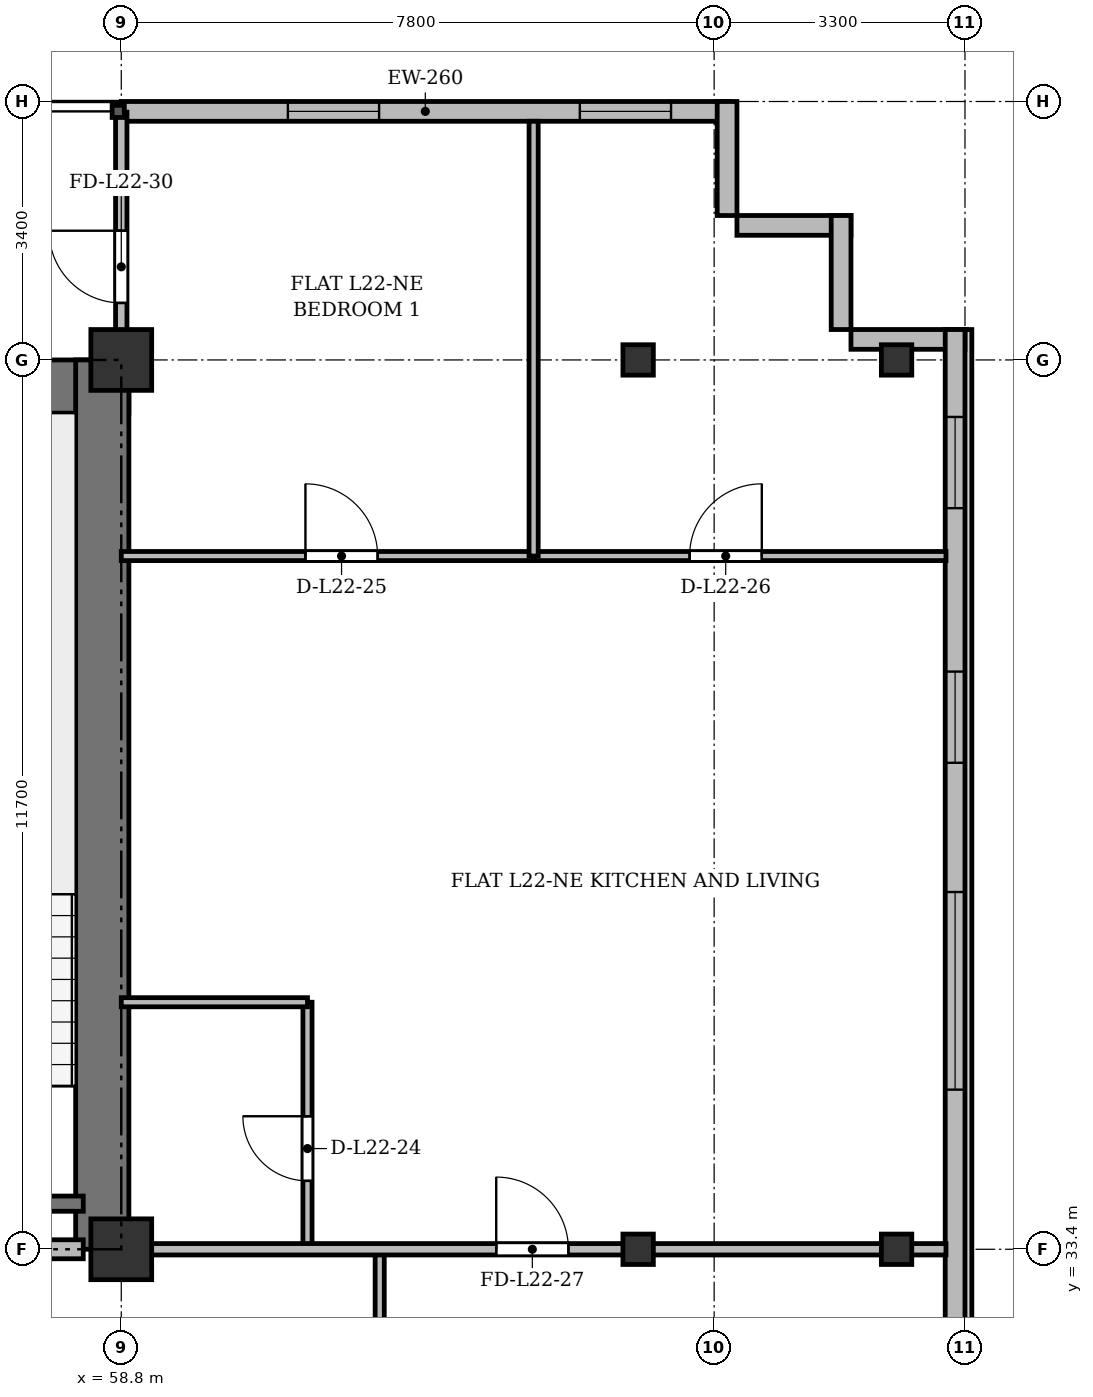
"""IFC4 building model, lengths in metres.
Left out: names, types, materials, properties, quantities, classifications, styles, units other than length and angle.
Written with IfcOpenShell. Run it as: python <this file> out.ifc"""

import sys

from ifc_helpers import new_model, si_unit, direction, frame, frame_2d, origin, origin_2d, place, context, subcontext, project, spatial, rectangle, i_section, extrude, source, transform, mapped, element, fill, save


model = new_model("IFC4")
c1 = context("Model", 3, precision=1e-05, world=origin(), true_north=direction((0.0, 1.0)))
c2 = subcontext(c1, "Body", "Model", "MODEL_VIEW")
j1 = project(units=[si_unit("LENGTHUNIT", "METRE"), si_unit("PLANEANGLEUNIT", "RADIAN")], contexts=[c1])
p1 = place(None, origin())
s1 = spatial("IfcSite", under=j1, at=p1, CompositionType="ELEMENT")
p2 = place(p1, origin())
s2 = spatial("IfcBuilding", under=s1, at=p2, CompositionType="ELEMENT")
p3 = place(p2, frame((0.0, 0.0, 88.9)))
s3 = spatial("IfcBuildingStorey", under=s2, at=p3, CompositionType="ELEMENT", Elevation=88.9)
m1 = source(origin(), c2, "Body", "SweptSolid", [
    extrude(rectangle(XDim=0.8, YDim=0.8, at=origin_2d()), origin(), (0.0, 0.0, 1.0), 3.6),
])
for number, where, z_axis, x_axis in (
    (1, (58.8, 33.4, 0.0), (0.0, 0.0, 1.0), (1.0, 0.0, 0.0)),
    (2, (58.8, 45.1, 0.0), (0.0, 0.0, 1.0), (1.0, 0.0, 0.0)),
):
    element("IfcColumn", number, at=place(p3, frame(where, z_axis=z_axis, x_axis=x_axis)), inside=s3, PredefinedType="COLUMN", context=c2, shape_type="MappedRepresentation", body=[
        mapped(m1, transform((0.0, 0.0, 0.0), x_axis=(1.0, 0.0, 0.0), y_axis=(0.0, 1.0, 0.0), z_axis=(0.0, 0.0, 1.0), scale=1.0)),
    ])
m2 = source(origin(), c2, "Body", "SweptSolid", [
    extrude(i_section(OverallWidth=0.4, OverallDepth=0.4, WebThickness=0.022, FlangeThickness=0.035, at=origin_2d()), origin(), (0.0, 0.0, 1.0), 3.6),
])
for number, where, z_axis, x_axis in (
    (3, (65.6, 33.4, 0.0), (0.0, 0.0, 1.0), (1.0, 0.0, 0.0)),
    (4, (65.6, 45.1, 0.0), (0.0, 0.0, 1.0), (1.0, 0.0, 0.0)),
    (5, (69.0, 33.4, 0.0), (0.0, 0.0, 1.0), (1.0, 0.0, 0.0)),
    (6, (69.0, 45.1, 0.0), (0.0, 0.0, 1.0), (1.0, 0.0, 0.0)),
):
    element("IfcColumn", number, at=place(p3, frame(where, z_axis=z_axis, x_axis=x_axis)), inside=s3, PredefinedType="COLUMN", context=c2, shape_type="MappedRepresentation", body=[
        mapped(m2, transform((0.0, 0.0, 0.0), x_axis=(1.0, 0.0, 0.0), y_axis=(0.0, 1.0, 0.0), z_axis=(0.0, 0.0, 1.0), scale=1.0)),
    ])
p4 = place(p3, frame((58.8, 48.37, 0.0), z_axis=(0.0, 0.0, 1.0), x_axis=(1.0, 0.0, 0.0)))
e7 = element("IfcWall", 7, at=p4, inside=s3, PredefinedType="SOLIDWALL", context=c2, shape_type="SweptSolid", body=[
    extrude(rectangle(XDim=8.0, YDim=0.26, at=frame_2d((4.0, 0.0))), origin(), (0.0, 0.0, 1.0), 3.34),
])
p5 = place(p4, frame((2.192, 0.0, 0.9)))
e8 = element("IfcOpeningElement", 8, at=p5, cuts=e7, PredefinedType="OPENING", context=c2, shape_type="SweptSolid", body=[
    extrude(rectangle(XDim=1.2, YDim=1.65, at=frame_2d((0.6, 0.825))), frame((0.0, 0.14, 0.0), z_axis=(0.0, -1.0, 0.0), x_axis=(1.0, 0.0, 0.0)), (0.0, 0.0, 1.0), 0.28),
])
p6 = place(p4, frame((6.033, 0.0, 0.9)))
e9 = element("IfcOpeningElement", 9, at=p6, cuts=e7, PredefinedType="OPENING", context=c2, shape_type="SweptSolid", body=[
    extrude(rectangle(XDim=1.2, YDim=1.65, at=frame_2d((0.6, 0.825))), frame((0.0, 0.14, 0.0), z_axis=(0.0, -1.0, 0.0), x_axis=(1.0, 0.0, 0.0)), (0.0, 0.0, 1.0), 0.28),
])
for number, where, z_axis, x_axis in (
    (10, (66.77, 48.5, 0.0), (0.0, 0.0, 1.0), (0.0, -1.0, 0.0)),
    (11, (66.9, 46.87, 0.0), (0.0, 0.0, 1.0), (1.0, 0.0, 0.0)),
    (12, (68.27, 47.0, 0.0), (0.0, 0.0, 1.0), (0.0, -1.0, 0.0)),
):
    element("IfcWall", number, at=place(p3, frame(where, z_axis=z_axis, x_axis=x_axis)), inside=s3, PredefinedType="SOLIDWALL", context=c2, shape_type="SweptSolid", body=[
        extrude(rectangle(XDim=1.5, YDim=0.26, at=frame_2d((0.75, 0.0))), origin(), (0.0, 0.0, 1.0), 3.34),
    ])
p7 = place(p3, frame((68.4, 45.37, 0.0), z_axis=(0.0, 0.0, 1.0), x_axis=(1.0, 0.0, 0.0)))
e13 = element("IfcWall", 13, at=p7, inside=s3, PredefinedType="SOLIDWALL", context=c2, shape_type="SweptSolid", body=[
    extrude(rectangle(XDim=1.5, YDim=0.26, at=frame_2d((0.75, 0.0))), origin(), (0.0, 0.0, 1.0), 2.752),
])
p8 = place(p3, frame((69.77, 45.5, 0.0), z_axis=(0.0, 0.0, 1.0), x_axis=(0.0, -1.0, 0.0)))
e14 = element("IfcWall", 14, at=p8, inside=s3, PredefinedType="SOLIDWALL", context=c2, shape_type="SweptSolid", body=[
    extrude(rectangle(XDim=39.6, YDim=0.26, at=frame_2d((19.8, 0.0))), origin(), (0.0, 0.0, 1.0), 3.34),
])
p9 = place(p8, frame((36.95, 0.0, 0.92)))
e15 = element("IfcOpeningElement", 15, at=p9, cuts=e14, PredefinedType="OPENING", context=c2, shape_type="SweptSolid", body=[
    extrude(rectangle(XDim=1.2, YDim=1.65, at=frame_2d((0.6, 0.825))), frame((0.0, 0.14, 0.0), z_axis=(0.0, -1.0, 0.0), x_axis=(1.0, 0.0, 0.0)), (0.0, 0.0, 1.0), 0.28),
])
p10 = place(p8, frame((32.8, 0.0, 0.92)))
e16 = element("IfcOpeningElement", 16, at=p10, cuts=e14, PredefinedType="OPENING", context=c2, shape_type="SweptSolid", body=[
    extrude(rectangle(XDim=2.6, YDim=1.9, at=frame_2d((1.3, 0.95))), frame((0.0, 0.14, 0.0), z_axis=(0.0, -1.0, 0.0), x_axis=(1.0, 0.0, 0.0)), (0.0, 0.0, 1.0), 0.28),
])
p11 = place(p8, frame((28.6, 0.0, 0.92)))
e17 = element("IfcOpeningElement", 17, at=p11, cuts=e14, PredefinedType="OPENING", context=c2, shape_type="SweptSolid", body=[
    extrude(rectangle(XDim=2.6, YDim=1.9, at=frame_2d((1.3, 0.95))), frame((0.0, 0.14, 0.0), z_axis=(0.0, -1.0, 0.0), x_axis=(1.0, 0.0, 0.0)), (0.0, 0.0, 1.0), 0.28),
])
p12 = place(p8, frame((21.4, 0.0, 0.92)))
e18 = element("IfcOpeningElement", 18, at=p12, cuts=e14, PredefinedType="OPENING", context=c2, shape_type="SweptSolid", body=[
    extrude(rectangle(XDim=2.6, YDim=1.9, at=frame_2d((1.3, 0.95))), frame((0.0, 0.14, 0.0), z_axis=(0.0, -1.0, 0.0), x_axis=(1.0, 0.0, 0.0)), (0.0, 0.0, 1.0), 0.28),
])
p13 = place(p8, frame((7.4, 0.0, 0.92)))
e19 = element("IfcOpeningElement", 19, at=p13, cuts=e14, PredefinedType="OPENING", context=c2, shape_type="SweptSolid", body=[
    extrude(rectangle(XDim=2.6, YDim=1.9, at=frame_2d((1.3, 0.95))), frame((0.0, 0.14, 0.0), z_axis=(0.0, -1.0, 0.0), x_axis=(1.0, 0.0, 0.0)), (0.0, 0.0, 1.0), 0.28),
])
p14 = place(p8, frame((4.5, 0.0, 0.92)))
e20 = element("IfcOpeningElement", 20, at=p14, cuts=e14, PredefinedType="OPENING", context=c2, shape_type="SweptSolid", body=[
    extrude(rectangle(XDim=1.2, YDim=1.65, at=frame_2d((0.6, 0.825))), frame((0.0, 0.14, 0.0), z_axis=(0.0, -1.0, 0.0), x_axis=(1.0, 0.0, 0.0)), (0.0, 0.0, 1.0), 0.28),
])
p15 = place(p8, frame((1.15, 0.0, 0.92)))
e21 = element("IfcOpeningElement", 21, at=p15, cuts=e14, PredefinedType="OPENING", context=c2, shape_type="SweptSolid", body=[
    extrude(rectangle(XDim=1.2, YDim=1.65, at=frame_2d((0.6, 0.825))), frame((0.0, 0.14, 0.0), z_axis=(0.0, -1.0, 0.0), x_axis=(1.0, 0.0, 0.0)), (0.0, 0.0, 1.0), 0.28),
])
p16 = place(p3, frame((15.5, 44.75, 0.0), z_axis=(0.0, 0.0, 1.0), x_axis=(1.0, 0.0, 0.0)))
e22 = element("IfcWall", 22, at=p16, inside=s3, PredefinedType="SHEAR", context=c2, shape_type="SweptSolid", body=[
    extrude(rectangle(XDim=43.4, YDim=0.7, at=frame_2d((21.7, 0.0))), origin(), (0.0, 0.0, 1.0), 3.34),
])
p17 = place(p3, frame((58.55, 33.4, 0.0), z_axis=(0.0, 0.0, 1.0), x_axis=(0.0, 1.0, 0.0)))
e23 = element("IfcWall", 23, at=p17, inside=s3, PredefinedType="SHEAR", context=c2, shape_type="SweptSolid", body=[
    extrude(rectangle(XDim=11.7, YDim=0.7, at=frame_2d((5.85, 0.0))), origin(), (0.0, 0.0, 1.0), 3.34),
])
p18 = place(p3, frame((54.9, 34.0, 0.0), z_axis=(0.0, 0.0, 1.0), x_axis=(1.0, 0.0, 0.0)))
e24 = element("IfcWall", 24, at=p18, inside=s3, PredefinedType="SHEAR", context=c2, shape_type="SweptSolid", body=[
    extrude(rectangle(XDim=3.4, YDim=0.2, at=frame_2d((1.7, 0.0))), origin(), (0.0, 0.0, 1.0), 3.34),
])
p19 = place(p3, frame((47.15, 33.4, 0.0), z_axis=(0.0, 0.0, 1.0), x_axis=(1.0, 0.0, 0.0)))
e25 = element("IfcWall", 25, at=p19, inside=s3, PredefinedType="PARTITIONING", context=c2, shape_type="SweptSolid", body=[
    extrude(rectangle(XDim=11.15, YDim=0.25, at=frame_2d((5.575, 0.0))), origin(), (0.0, 0.0, 1.0), 2.752),
])
p20 = place(p19, frame((0.7, 0.0, 0.0)))
e26 = element("IfcOpeningElement", 26, at=p20, cuts=e25, PredefinedType="OPENING", context=c2, shape_type="SweptSolid", body=[
    extrude(rectangle(XDim=0.95, YDim=2.15, at=frame_2d((0.475, 1.075))), frame((0.0, 0.135, 0.0), z_axis=(0.0, -1.0, 0.0), x_axis=(1.0, 0.0, 0.0)), (0.0, 0.0, 1.0), 0.27),
])
p21 = place(p19, frame((6.0, 0.0, 0.0)))
e27 = element("IfcOpeningElement", 27, at=p21, cuts=e25, PredefinedType="OPENING", context=c2, shape_type="SweptSolid", body=[
    extrude(rectangle(XDim=1.2, YDim=2.15, at=frame_2d((0.6, 1.075))), frame((0.0, 0.135, 0.0), z_axis=(0.0, -1.0, 0.0), x_axis=(1.0, 0.0, 0.0)), (0.0, 0.0, 1.0), 0.27),
])
p22 = place(p3, frame((62.2, 29.8, 0.0), z_axis=(0.0, 0.0, 1.0), x_axis=(0.0, 1.0, 0.0)))
e28 = element("IfcWall", 28, at=p22, inside=s3, PredefinedType="PARTITIONING", context=c2, shape_type="SweptSolid", body=[
    extrude(rectangle(XDim=3.6, YDim=0.12, at=frame_2d((1.8, 0.0))), origin(), (0.0, 0.0, 1.0), 2.752),
])
p23 = place(p3, frame((61.25, 33.4, 0.0), z_axis=(0.0, 0.0, 1.0), x_axis=(0.0, 1.0, 0.0)))
e29 = element("IfcWall", 29, at=p23, inside=s3, PredefinedType="PARTITIONING", context=c2, shape_type="SweptSolid", body=[
    extrude(rectangle(XDim=3.25, YDim=0.12, at=frame_2d((1.625, 0.0))), origin(), (0.0, 0.0, 1.0), 2.752),
])
p24 = place(p23, frame((0.9, 0.0, 0.0)))
e30 = element("IfcOpeningElement", 30, at=p24, cuts=e29, PredefinedType="OPENING", context=c2, shape_type="SweptSolid", body=[
    extrude(rectangle(XDim=0.85, YDim=2.1, at=frame_2d((0.425, 1.05))), frame((0.0, 0.07, 0.0), z_axis=(0.0, -1.0, 0.0), x_axis=(1.0, 0.0, 0.0)), (0.0, 0.0, 1.0), 0.14),
])
p25 = place(p3, frame((58.8, 36.65, 0.0), z_axis=(0.0, 0.0, 1.0), x_axis=(1.0, 0.0, 0.0)))
e31 = element("IfcWall", 31, at=p25, inside=s3, PredefinedType="PARTITIONING", context=c2, shape_type="SweptSolid", body=[
    extrude(rectangle(XDim=2.45, YDim=0.12, at=frame_2d((1.225, 0.0))), origin(), (0.0, 0.0, 1.0), 2.84),
])
p26 = place(p3, frame((58.8, 42.52, 0.0), z_axis=(0.0, 0.0, 1.0), x_axis=(1.0, 0.0, 0.0)))
e32 = element("IfcWall", 32, at=p26, inside=s3, PredefinedType="PARTITIONING", context=c2, shape_type="SweptSolid", body=[
    extrude(rectangle(XDim=5.425, YDim=0.12, at=frame_2d((2.712, 0.0))), origin(), (0.0, 0.0, 1.0), 2.84),
])
p27 = place(p26, frame((2.423, 0.0, 0.0)))
e33 = element("IfcOpeningElement", 33, at=p27, cuts=e32, PredefinedType="OPENING", context=c2, shape_type="SweptSolid", body=[
    extrude(rectangle(XDim=0.95, YDim=2.15, at=frame_2d((0.475, 1.075))), frame((0.0, 0.07, 0.0), z_axis=(0.0, -1.0, 0.0), x_axis=(1.0, 0.0, 0.0)), (0.0, 0.0, 1.0), 0.14),
])
p28 = place(p3, frame((64.225, 42.52, 0.0), z_axis=(0.0, 0.0, 1.0), x_axis=(1.0, 0.0, 0.0)))
e34 = element("IfcWall", 34, at=p28, inside=s3, PredefinedType="PARTITIONING", context=c2, shape_type="SweptSolid", body=[
    extrude(rectangle(XDim=5.425, YDim=0.12, at=frame_2d((2.712, 0.0))), origin(), (0.0, 0.0, 1.0), 2.84),
])
p29 = place(p28, frame((2.052, 0.0, 0.0)))
e35 = element("IfcOpeningElement", 35, at=p29, cuts=e34, PredefinedType="OPENING", context=c2, shape_type="SweptSolid", body=[
    extrude(rectangle(XDim=0.95, YDim=2.15, at=frame_2d((0.475, 1.075))), frame((0.0, 0.07, 0.0), z_axis=(0.0, -1.0, 0.0), x_axis=(1.0, 0.0, 0.0)), (0.0, 0.0, 1.0), 0.14),
])
p30 = place(p3, frame((64.225, 42.52, 0.0), z_axis=(0.0, 0.0, 1.0), x_axis=(0.0, 1.0, 0.0)))
e36 = element("IfcWall", 36, at=p30, inside=s3, PredefinedType="PARTITIONING", context=c2, shape_type="SweptSolid", body=[
    extrude(rectangle(XDim=5.72, YDim=0.12, at=frame_2d((2.86, 0.0))), origin(), (0.0, 0.0, 1.0), 2.752),
])
p31 = place(p3, frame((58.8, 33.4, 0.0), z_axis=(0.0, 0.0, 1.0), x_axis=(1.0, 0.0, 0.0)))
e37 = element("IfcWall", 37, at=p31, inside=s3, PredefinedType="PARTITIONING", context=c2, shape_type="SweptSolid", body=[
    extrude(rectangle(XDim=10.85, YDim=0.15, at=frame_2d((5.425, 0.0))), origin(), (0.0, 0.0, 1.0), 2.752),
])
p32 = place(p31, frame((4.933, 0.0, 0.0)))
e38 = element("IfcOpeningElement", 38, at=p32, cuts=e37, PredefinedType="OPENING", context=c2, shape_type="SweptSolid", body=[
    extrude(rectangle(XDim=0.95, YDim=2.15, at=frame_2d((0.475, 1.075))), frame((0.0, 0.085, 0.0), z_axis=(0.0, -1.0, 0.0), x_axis=(1.0, 0.0, 0.0)), (0.0, 0.0, 1.0), 0.17),
])
p33 = place(p3, frame((58.8, 44.75, 0.0), z_axis=(0.0, 0.0, 1.0), x_axis=(0.0, 1.0, 0.0)))
e39 = element("IfcWall", 39, at=p33, inside=s3, PredefinedType="PARTITIONING", context=c2, shape_type="SweptSolid", body=[
    extrude(rectangle(XDim=3.61, YDim=0.15, at=frame_2d((1.805, 0.0))), origin(), (0.0, 0.0, 1.0), 2.84),
])
p34 = place(p33, frame((1.1, 0.0, 0.0)))
e40 = element("IfcOpeningElement", 40, at=p34, cuts=e39, PredefinedType="OPENING", context=c2, shape_type="SweptSolid", body=[
    extrude(rectangle(XDim=0.95, YDim=2.15, at=frame_2d((0.475, 1.075))), frame((0.0, 0.085, 0.0), z_axis=(0.0, -1.0, 0.0), x_axis=(1.0, 0.0, 0.0)), (0.0, 0.0, 1.0), 0.17),
])
m3 = source(origin(), c2, "Body", "SweptSolid", [
    extrude(rectangle(XDim=1.2, YDim=1.65, at=frame_2d((0.6, 0.825))), frame((0.0, 0.03, 0.0), z_axis=(0.0, -1.0, 0.0), x_axis=(1.0, 0.0, 0.0)), (0.0, 0.0, 1.0), 0.06),
])
p35 = place(p5, origin())
e41 = element("IfcWindow", 41, at=p35, inside=s3, PartitioningType="SINGLE_PANEL", PredefinedType="WINDOW", context=c2, shape_type="MappedRepresentation", body=[
    mapped(m3, transform((0.0, 0.0, 0.0), x_axis=(1.0, 0.0, 0.0), y_axis=(0.0, 1.0, 0.0), z_axis=(0.0, 0.0, 1.0), scale=1.0)),
])
fill(e8, e41)
p36 = place(p6, origin())
e42 = element("IfcWindow", 42, at=p36, inside=s3, PartitioningType="SINGLE_PANEL", PredefinedType="WINDOW", context=c2, shape_type="MappedRepresentation", body=[
    mapped(m3, transform((0.0, 0.0, 0.0), x_axis=(1.0, 0.0, 0.0), y_axis=(0.0, 1.0, 0.0), z_axis=(0.0, 0.0, 1.0), scale=1.0)),
])
fill(e9, e42)
m4 = source(origin(), c2, "Body", "SweptSolid", [
    extrude(rectangle(XDim=2.6, YDim=1.9, at=frame_2d((1.3, 0.95))), frame((0.0, 0.03, 0.0), z_axis=(0.0, -1.0, 0.0), x_axis=(1.0, 0.0, 0.0)), (0.0, 0.0, 1.0), 0.06),
])
p37 = place(p13, origin())
e43 = element("IfcWindow", 43, at=p37, inside=s3, PartitioningType="SINGLE_PANEL", PredefinedType="WINDOW", context=c2, shape_type="MappedRepresentation", body=[
    mapped(m4, transform((0.0, 0.0, 0.0), x_axis=(1.0, 0.0, 0.0), y_axis=(0.0, 1.0, 0.0), z_axis=(0.0, 0.0, 1.0), scale=1.0)),
])
fill(e19, e43)
p38 = place(p14, origin())
e44 = element("IfcWindow", 44, at=p38, inside=s3, PartitioningType="SINGLE_PANEL", PredefinedType="WINDOW", context=c2, shape_type="MappedRepresentation", body=[
    mapped(m3, transform((0.0, 0.0, 0.0), x_axis=(1.0, 0.0, 0.0), y_axis=(0.0, 1.0, 0.0), z_axis=(0.0, 0.0, 1.0), scale=1.0)),
])
fill(e20, e44)
p39 = place(p15, origin())
e45 = element("IfcWindow", 45, at=p39, inside=s3, PartitioningType="SINGLE_PANEL", PredefinedType="WINDOW", context=c2, shape_type="MappedRepresentation", body=[
    mapped(m3, transform((0.0, 0.0, 0.0), x_axis=(1.0, 0.0, 0.0), y_axis=(0.0, 1.0, 0.0), z_axis=(0.0, 0.0, 1.0), scale=1.0)),
])
fill(e21, e45)
m5 = source(origin(), c2, "Body", "SweptSolid", [
    extrude(rectangle(XDim=0.85, YDim=2.1, at=frame_2d((0.425, 1.05))), frame((0.0, 0.025, 0.0), z_axis=(0.0, -1.0, 0.0), x_axis=(1.0, 0.0, 0.0)), (0.0, 0.0, 1.0), 0.05),
])
p40 = place(p24, origin())
e46 = element("IfcDoor", 46, at=p40, inside=s3, OperationType="SINGLE_SWING_RIGHT", PredefinedType="DOOR", context=c2, shape_type="MappedRepresentation", body=[
    mapped(m5, transform((0.0, 0.0, 0.0), x_axis=(1.0, 0.0, 0.0), y_axis=(0.0, 1.0, 0.0), z_axis=(0.0, 0.0, 1.0), scale=1.0)),
])
fill(e30, e46)
m6 = source(origin(), c2, "Body", "SweptSolid", [
    extrude(rectangle(XDim=0.95, YDim=2.15, at=frame_2d((0.475, 1.075))), frame((0.0, 0.025, 0.0), z_axis=(0.0, -1.0, 0.0), x_axis=(1.0, 0.0, 0.0)), (0.0, 0.0, 1.0), 0.05),
])
p41 = place(p27, origin())
e47 = element("IfcDoor", 47, at=p41, inside=s3, OperationType="SINGLE_SWING_LEFT", PredefinedType="DOOR", context=c2, shape_type="MappedRepresentation", body=[
    mapped(m6, transform((0.0, 0.0, 0.0), x_axis=(1.0, 0.0, 0.0), y_axis=(0.0, 1.0, 0.0), z_axis=(0.0, 0.0, 1.0), scale=1.0)),
])
fill(e33, e47)
p42 = place(p29, origin())
e48 = element("IfcDoor", 48, at=p42, inside=s3, OperationType="SINGLE_SWING_RIGHT", PredefinedType="DOOR", context=c2, shape_type="MappedRepresentation", body=[
    mapped(m6, transform((0.0, 0.0, 0.0), x_axis=(1.0, 0.0, 0.0), y_axis=(0.0, 1.0, 0.0), z_axis=(0.0, 0.0, 1.0), scale=1.0)),
])
fill(e35, e48)
p43 = place(p32, origin())
e49 = element("IfcDoor", 49, at=p43, inside=s3, OperationType="SINGLE_SWING_LEFT", PredefinedType="DOOR", context=c2, shape_type="MappedRepresentation", body=[
    mapped(m6, transform((0.0, 0.0, 0.0), x_axis=(1.0, 0.0, 0.0), y_axis=(0.0, 1.0, 0.0), z_axis=(0.0, 0.0, 1.0), scale=1.0)),
])
fill(e38, e49)
p44 = place(p34, origin())
e50 = element("IfcDoor", 50, at=p44, inside=s3, OperationType="SINGLE_SWING_RIGHT", PredefinedType="DOOR", context=c2, shape_type="MappedRepresentation", body=[
    mapped(m6, transform((0.0, 0.0, 0.0), x_axis=(1.0, 0.0, 0.0), y_axis=(0.0, 1.0, 0.0), z_axis=(0.0, 0.0, 1.0), scale=1.0)),
])
fill(e40, e50)
save(model, sys.argv[1])
